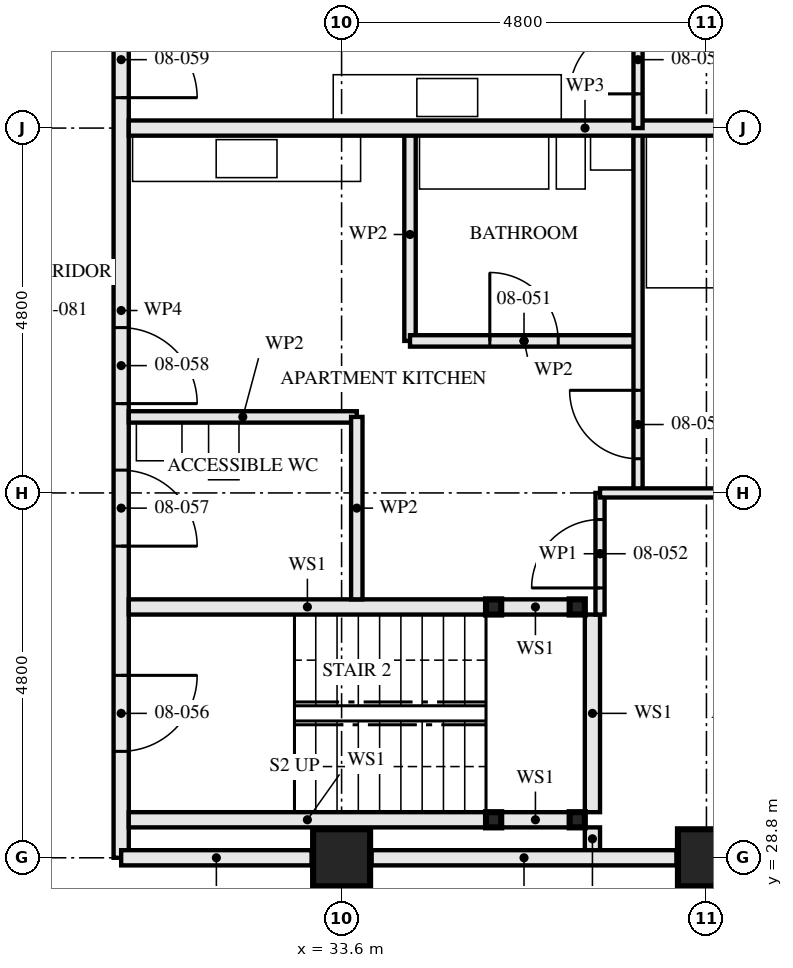
"""IFC4 building model, lengths in metres.
Left out: names, types, materials, properties, quantities, classifications, styles, units other than length and angle.
Written with IfcOpenShell. Run it as: python <this file> out.ifc"""

import sys

from ifc_helpers import new_model, si_unit, direction, frame, frame_2d, origin, origin_2d, place, context, subcontext, project, spatial, rectangle, hollow_rectangle, extrude, element, fill, save


model = new_model("IFC4")
c1 = context("Model", 3, precision=1e-05, world=origin(), true_north=direction((0.0, 1.0)))
c2 = subcontext(c1, "Body", "Model", "MODEL_VIEW")
j1 = project(units=[si_unit("LENGTHUNIT", "METRE"), si_unit("PLANEANGLEUNIT", "RADIAN")], contexts=[c1])
p1 = place(None, origin())
s1 = spatial("IfcSite", under=j1, at=p1, CompositionType="ELEMENT")
p2 = place(p1, origin())
s2 = spatial("IfcBuilding", under=s1, at=p2, CompositionType="ELEMENT")
p3 = place(p2, frame((0.0, 0.0, 34.0)))
s3 = spatial("IfcBuildingStorey", under=s2, at=p3, CompositionType="ELEMENT", Elevation=34.0)
for number, where, z_axis, x_axis in (
    (1, (33.6, 28.8, 0.0), (0.0, 0.0, 1.0), (0.0, 1.0, 0.0)),
    (2, (38.4, 28.8, 0.0), (0.0, 0.0, 1.0), (0.0, 1.0, 0.0)),
):
    element("IfcColumn", number, at=place(p3, frame(where, z_axis=z_axis, x_axis=x_axis)), inside=s3, PredefinedType="COLUMN", context=c2, shape_type="SweptSolid", body=[
        extrude(hollow_rectangle(XDim=0.75, YDim=0.75, WallThickness=0.08, at=origin_2d()), origin(), (0.0, 0.0, 1.0), 3.5),
    ])
for number, where, z_axis, x_axis in (
    (3, (36.7, 29.3, 0.0), (0.0, 0.0, 1.0), (1.0, 0.0, 0.0)),
    (4, (36.7, 32.1, 0.0), (0.0, 0.0, 1.0), (1.0, 0.0, 0.0)),
    (5, (35.6, 29.3, 0.0), (0.0, 0.0, 1.0), (1.0, 0.0, 0.0)),
    (6, (35.6, 32.1, 0.0), (0.0, 0.0, 1.0), (1.0, 0.0, 0.0)),
):
    element("IfcColumn", number, at=place(p3, frame(where, z_axis=z_axis, x_axis=x_axis)), inside=s3, PredefinedType="COLUMN", context=c2, shape_type="SweptSolid", body=[
        extrude(hollow_rectangle(XDim=0.2, YDim=0.2, WallThickness=0.008, at=origin_2d()), origin(), (0.0, 0.0, 1.0), 3.33),
    ])
p4 = place(p3, frame((38.4, 26.8, 0.0), z_axis=(0.0, 0.0, 1.0), x_axis=(0.0, 1.0, 0.0)))
e7 = element("IfcWall", 7, at=p4, inside=s3, PredefinedType="PARTITIONING", context=c2, shape_type="SweptSolid", body=[
    extrude(rectangle(XDim=1.605, YDim=0.2, at=frame_2d((0.802, 0.0))), origin(), (0.0, 0.0, 1.0), 3.33),
])
p5 = place(p4, frame((0.55, 0.0, 0.0)))
e8 = element("IfcOpeningElement", 8, at=p5, cuts=e7, PredefinedType="OPENING", context=c2, shape_type="SweptSolid", body=[
    extrude(rectangle(XDim=1.0, YDim=2.1, at=frame_2d((0.5, 1.05))), frame((0.0, 0.111, 0.0), z_axis=(0.0, -1.0, 0.0), x_axis=(1.0, 0.0, 0.0)), (0.0, 0.0, 1.0), 0.221),
])
p6 = place(p3, frame((36.6, 29.3, 0.0), z_axis=(0.0, 0.0, 1.0), x_axis=(-1.0, 0.0, 0.0)))
e9 = element("IfcWall", 9, at=p6, inside=s3, PredefinedType="SOLIDWALL", context=c2, shape_type="SweptSolid", body=[
    extrude(rectangle(XDim=0.9, YDim=0.2, at=frame_2d((0.45, 0.0))), origin(), (0.0, 0.0, 1.0), 2.99),
])
p7 = place(p3, frame((35.5, 29.3, 0.0), z_axis=(0.0, 0.0, 1.0), x_axis=(-1.0, 0.0, 0.0)))
e10 = element("IfcWall", 10, at=p7, inside=s3, PredefinedType="SOLIDWALL", context=c2, shape_type="SweptSolid", body=[
    extrude(rectangle(XDim=4.7, YDim=0.2, at=frame_2d((2.35, 0.0))), origin(), (0.0, 0.0, 1.0), 2.99),
])
p8 = place(p3, frame((36.6, 32.1, 0.0), z_axis=(0.0, 0.0, 1.0), x_axis=(-1.0, 0.0, 0.0)))
e11 = element("IfcWall", 11, at=p8, inside=s3, PredefinedType="SOLIDWALL", context=c2, shape_type="SweptSolid", body=[
    extrude(rectangle(XDim=0.9, YDim=0.2, at=frame_2d((0.45, 0.0))), origin(), (0.0, 0.0, 1.0), 2.99),
])
p9 = place(p3, frame((35.5, 32.1, 0.0), z_axis=(0.0, 0.0, 1.0), x_axis=(-1.0, 0.0, 0.0)))
e12 = element("IfcWall", 12, at=p9, inside=s3, PredefinedType="SOLIDWALL", context=c2, shape_type="SweptSolid", body=[
    extrude(rectangle(XDim=4.7, YDim=0.2, at=frame_2d((2.35, 0.0))), origin(), (0.0, 0.0, 1.0), 2.99),
])
p10 = place(p3, frame((36.9, 28.9, 0.0), z_axis=(0.0, 0.0, 1.0), x_axis=(0.0, 1.0, 0.0)))
e13 = element("IfcWall", 13, at=p10, inside=s3, PredefinedType="SOLIDWALL", context=c2, shape_type="SweptSolid", body=[
    extrude(rectangle(XDim=0.3, YDim=0.2, at=frame_2d((0.15, 0.0))), origin(), (0.0, 0.0, 1.0), 3.33),
])
p11 = place(p3, frame((36.9, 29.4, 0.0), z_axis=(0.0, 0.0, 1.0), x_axis=(0.0, 1.0, 0.0)))
e14 = element("IfcWall", 14, at=p11, inside=s3, PredefinedType="SOLIDWALL", context=c2, shape_type="SweptSolid", body=[
    extrude(rectangle(XDim=2.6, YDim=0.2, at=frame_2d((1.3, 0.0))), origin(), (0.0, 0.0, 1.0), 3.33),
])
p12 = place(p3, frame((33.8, 32.2, 0.0), z_axis=(0.0, 0.0, 1.0), x_axis=(0.0, 1.0, 0.0)))
e15 = element("IfcWall", 15, at=p12, inside=s3, PredefinedType="PARTITIONING", context=c2, shape_type="SweptSolid", body=[
    extrude(rectangle(XDim=2.4, YDim=0.15, at=frame_2d((1.2, 0.0))), origin(), (0.0, 0.0, 1.0), 2.55),
])
p13 = place(p3, frame((33.8, 34.6, 0.0), z_axis=(0.0, 0.0, 1.0), x_axis=(-1.0, 0.0, 0.0)))
e16 = element("IfcWall", 16, at=p13, inside=s3, PredefinedType="PARTITIONING", context=c2, shape_type="SweptSolid", body=[
    extrude(rectangle(XDim=3.0, YDim=0.15, at=frame_2d((1.5, 0.0))), origin(), (0.0, 0.0, 1.0), 3.33),
])
p14 = place(p3, frame((37.5, 35.6, 0.0), z_axis=(0.0, 0.0, 1.0), x_axis=(-1.0, 0.0, 0.0)))
e17 = element("IfcWall", 17, at=p14, inside=s3, PredefinedType="PARTITIONING", context=c2, shape_type="SweptSolid", body=[
    extrude(rectangle(XDim=3.0, YDim=0.15, at=frame_2d((1.5, 0.0))), origin(), (0.0, 0.0, 1.0), 3.33),
])
p15 = place(p14, frame((1.05, 0.0, 0.0)))
e18 = element("IfcOpeningElement", 18, at=p15, cuts=e17, PredefinedType="OPENING", context=c2, shape_type="SweptSolid", body=[
    extrude(rectangle(XDim=0.9, YDim=2.1, at=frame_2d((0.45, 1.05))), frame((0.0, 0.085, 0.0), z_axis=(0.0, -1.0, 0.0), x_axis=(1.0, 0.0, 0.0)), (0.0, 0.0, 1.0), 0.171),
])
p16 = place(p3, frame((34.5, 35.6, 0.0), z_axis=(0.0, 0.0, 1.0), x_axis=(0.0, 1.0, 0.0)))
e19 = element("IfcWall", 19, at=p16, inside=s3, PredefinedType="PARTITIONING", context=c2, shape_type="SweptSolid", body=[
    extrude(rectangle(XDim=2.8, YDim=0.15, at=frame_2d((1.4, 0.0))), origin(), (0.0, 0.0, 1.0), 3.33),
])
p17 = place(p3, frame((37.0, 32.0, 0.0), z_axis=(0.0, 0.0, 1.0), x_axis=(0.0, 1.0, 0.0)))
e20 = element("IfcWall", 20, at=p17, inside=s3, PredefinedType="PARTITIONING", context=c2, shape_type="SweptSolid", body=[
    extrude(rectangle(XDim=1.6, YDim=0.12, at=frame_2d((0.8, 0.0))), origin(), (0.0, 0.0, 1.0), 3.33),
])
p18 = place(p17, frame((0.35, 0.0, 0.0)))
e21 = element("IfcOpeningElement", 21, at=p18, cuts=e20, PredefinedType="OPENING", context=c2, shape_type="SweptSolid", body=[
    extrude(rectangle(XDim=0.9, YDim=2.1, at=frame_2d((0.45, 1.05))), frame((0.0, 0.071, 0.0), z_axis=(0.0, -1.0, 0.0), x_axis=(1.0, 0.0, 0.0)), (0.0, 0.0, 1.0), 0.141),
])
p19 = place(p3, frame((37.5, 33.6, 0.0), z_axis=(0.0, 0.0, 1.0), x_axis=(0.0, 1.0, 0.0)))
e22 = element("IfcWall", 22, at=p19, inside=s3, PredefinedType="PARTITIONING", context=c2, shape_type="SweptSolid", body=[
    extrude(rectangle(XDim=4.8, YDim=0.12, at=frame_2d((2.4, 0.0))), origin(), (0.0, 0.0, 1.0), 3.33),
])
p20 = place(p19, frame((0.45, 0.0, 0.0)))
e23 = element("IfcOpeningElement", 23, at=p20, cuts=e22, PredefinedType="OPENING", context=c2, shape_type="SweptSolid", body=[
    extrude(rectangle(XDim=0.9, YDim=2.1, at=frame_2d((0.45, 1.05))), frame((0.0, 0.071, 0.0), z_axis=(0.0, -1.0, 0.0), x_axis=(1.0, 0.0, 0.0)), (0.0, 0.0, 1.0), 0.141),
])
p21 = place(p3, frame((42.805, 33.6, 0.0), z_axis=(0.0, 0.0, 1.0), x_axis=(-1.0, 0.0, 0.0)))
e24 = element("IfcWall", 24, at=p21, inside=s3, PredefinedType="PARTITIONING", context=c2, shape_type="SweptSolid", body=[
    extrude(rectangle(XDim=5.805, YDim=0.12, at=frame_2d((2.902, 0.0))), origin(), (0.0, 0.0, 1.0), 2.55),
])
p22 = place(p3, frame((42.805, 38.4, 0.0), z_axis=(0.0, 0.0, 1.0), x_axis=(-1.0, 0.0, 0.0)))
e25 = element("IfcWall", 25, at=p22, inside=s3, PredefinedType="PARTITIONING", context=c2, shape_type="SweptSolid", body=[
    extrude(rectangle(XDim=12.005, YDim=0.2, at=frame_2d((6.002, 0.0))), origin(), (0.0, 0.0, 1.0), 2.55),
])
p23 = place(p3, frame((37.5, 38.4, 0.0), z_axis=(0.0, 0.0, 1.0), x_axis=(0.0, 1.0, 0.0)))
e26 = element("IfcWall", 26, at=p23, inside=s3, PredefinedType="PARTITIONING", context=c2, shape_type="SweptSolid", body=[
    extrude(rectangle(XDim=4.8, YDim=0.12, at=frame_2d((2.4, 0.0))), origin(), (0.0, 0.0, 1.0), 3.33),
])
p24 = place(p23, frame((0.45, 0.0, 0.0)))
e27 = element("IfcOpeningElement", 27, at=p24, cuts=e26, PredefinedType="OPENING", context=c2, shape_type="SweptSolid", body=[
    extrude(rectangle(XDim=0.9, YDim=2.1, at=frame_2d((0.45, 1.05))), frame((0.0, 0.071, 0.0), z_axis=(0.0, -1.0, 0.0), x_axis=(1.0, 0.0, 0.0)), (0.0, 0.0, 1.0), 0.141),
])
p25 = place(p3, frame((30.7, 28.8, 0.0), z_axis=(0.0, 0.0, 1.0), x_axis=(0.0, 1.0, 0.0)))
e28 = element("IfcWall", 28, at=p25, inside=s3, PredefinedType="PARTITIONING", context=c2, shape_type="SweptSolid", body=[
    extrude(rectangle(XDim=14.4, YDim=0.2, at=frame_2d((7.2, 0.0))), origin(), (0.0, 0.0, 1.0), 2.55),
])
p26 = place(p25, frame((1.4, 0.0, 0.0)))
e29 = element("IfcOpeningElement", 29, at=p26, cuts=e28, PredefinedType="OPENING", context=c2, shape_type="SweptSolid", body=[
    extrude(rectangle(XDim=1.0, YDim=2.1, at=frame_2d((0.5, 1.05))), frame((0.0, 0.111, 0.0), z_axis=(0.0, -1.0, 0.0), x_axis=(1.0, 0.0, 0.0)), (0.0, 0.0, 1.0), 0.221),
])
p27 = place(p25, frame((4.1, 0.0, 0.0)))
e30 = element("IfcOpeningElement", 30, at=p27, cuts=e28, PredefinedType="OPENING", context=c2, shape_type="SweptSolid", body=[
    extrude(rectangle(XDim=1.0, YDim=2.1, at=frame_2d((0.5, 1.05))), frame((0.0, 0.111, 0.0), z_axis=(0.0, -1.0, 0.0), x_axis=(1.0, 0.0, 0.0)), (0.0, 0.0, 1.0), 0.221),
])
p28 = place(p25, frame((5.975, 0.0, 0.0)))
e31 = element("IfcOpeningElement", 31, at=p28, cuts=e28, PredefinedType="OPENING", context=c2, shape_type="SweptSolid", body=[
    extrude(rectangle(XDim=1.0, YDim=2.1, at=frame_2d((0.5, 1.05))), frame((0.0, 0.111, 0.0), z_axis=(0.0, -1.0, 0.0), x_axis=(1.0, 0.0, 0.0)), (0.0, 0.0, 1.0), 0.221),
])
p29 = place(p25, frame((10.0, 0.0, 0.0)))
e32 = element("IfcOpeningElement", 32, at=p29, cuts=e28, PredefinedType="OPENING", context=c2, shape_type="SweptSolid", body=[
    extrude(rectangle(XDim=1.0, YDim=2.1, at=frame_2d((0.5, 1.05))), frame((0.0, 0.111, 0.0), z_axis=(0.0, -1.0, 0.0), x_axis=(1.0, 0.0, 0.0)), (0.0, 0.0, 1.0), 0.221),
])
p30 = place(p3, frame((38.005, 28.8, 0.0), z_axis=(0.0, 0.0, 1.0), x_axis=(-1.0, 0.0, 0.0)))
e33 = element("IfcWall", 33, at=p30, inside=s3, PredefinedType="PARTITIONING", context=c2, shape_type="SweptSolid", body=[
    extrude(rectangle(XDim=4.01, YDim=0.2, at=frame_2d((2.005, 0.0))), origin(), (0.0, 0.0, 1.0), 2.32),
])
p31 = place(p3, frame((33.205, 28.8, 0.0), z_axis=(0.0, 0.0, 1.0), x_axis=(-1.0, 0.0, 0.0)))
e34 = element("IfcWall", 34, at=p31, inside=s3, PredefinedType="PARTITIONING", context=c2, shape_type="SweptSolid", body=[
    extrude(rectangle(XDim=2.505, YDim=0.2, at=frame_2d((1.252, 0.0))), origin(), (0.0, 0.0, 1.0), 2.32),
])
p32 = place(p15, frame((0.9, 0.0, 0.0), z_axis=(0.0, 0.0, 1.0), x_axis=(-1.0, 0.0, 0.0)))
e35 = element("IfcDoor", 35, at=p32, inside=s3, OperationType="SINGLE_SWING_RIGHT", PredefinedType="DOOR", context=c2, shape_type="SweptSolid", body=[
    extrude(rectangle(XDim=0.9, YDim=2.1, at=frame_2d((0.45, 1.05))), frame((0.0, 0.022, 0.0), z_axis=(0.0, -1.0, 0.0), x_axis=(1.0, 0.0, 0.0)), (0.0, 0.0, 1.0), 0.044),
])
fill(e18, e35)
p33 = place(p18, origin())
e36 = element("IfcDoor", 36, at=p33, inside=s3, OperationType="SINGLE_SWING_RIGHT", PredefinedType="DOOR", context=c2, shape_type="SweptSolid", body=[
    extrude(rectangle(XDim=0.9, YDim=2.1, at=frame_2d((0.45, 1.05))), frame((0.0, 0.022, 0.0), z_axis=(0.0, -1.0, 0.0), x_axis=(1.0, 0.0, 0.0)), (0.0, 0.0, 1.0), 0.044),
])
fill(e21, e36)
p34 = place(p20, origin())
e37 = element("IfcDoor", 37, at=p34, inside=s3, OperationType="SINGLE_SWING_LEFT", PredefinedType="DOOR", context=c2, shape_type="SweptSolid", body=[
    extrude(rectangle(XDim=0.9, YDim=2.1, at=frame_2d((0.45, 1.05))), frame((0.0, 0.022, 0.0), z_axis=(0.0, -1.0, 0.0), x_axis=(1.0, 0.0, 0.0)), (0.0, 0.0, 1.0), 0.044),
])
fill(e23, e37)
p35 = place(p24, origin())
e38 = element("IfcDoor", 38, at=p35, inside=s3, OperationType="SINGLE_SWING_RIGHT", PredefinedType="DOOR", context=c2, shape_type="SweptSolid", body=[
    extrude(rectangle(XDim=0.9, YDim=2.1, at=frame_2d((0.45, 1.05))), frame((0.0, 0.022, 0.0), z_axis=(0.0, -1.0, 0.0), x_axis=(1.0, 0.0, 0.0)), (0.0, 0.0, 1.0), 0.044),
])
fill(e27, e38)
p36 = place(p26, frame((1.0, 0.0, 0.0), z_axis=(0.0, 0.0, 1.0), x_axis=(-1.0, 0.0, 0.0)))
e39 = element("IfcDoor", 39, at=p36, inside=s3, OperationType="SINGLE_SWING_RIGHT", PredefinedType="DOOR", context=c2, shape_type="SweptSolid", body=[
    extrude(rectangle(XDim=1.0, YDim=2.1, at=frame_2d((0.5, 1.05))), frame((0.0, 0.032, 0.0), z_axis=(0.0, -1.0, 0.0), x_axis=(1.0, 0.0, 0.0)), (0.0, 0.0, 1.0), 0.064),
])
fill(e29, e39)
p37 = place(p27, frame((1.0, 0.0, 0.0), z_axis=(0.0, 0.0, 1.0), x_axis=(-1.0, 0.0, 0.0)))
e40 = element("IfcDoor", 40, at=p37, inside=s3, OperationType="SINGLE_SWING_LEFT", PredefinedType="DOOR", context=c2, shape_type="SweptSolid", body=[
    extrude(rectangle(XDim=1.0, YDim=2.1, at=frame_2d((0.5, 1.05))), frame((0.0, 0.027, 0.0), z_axis=(0.0, -1.0, 0.0), x_axis=(1.0, 0.0, 0.0)), (0.0, 0.0, 1.0), 0.054),
])
fill(e30, e40)
p38 = place(p28, frame((1.0, 0.0, 0.0), z_axis=(0.0, 0.0, 1.0), x_axis=(-1.0, 0.0, 0.0)))
e41 = element("IfcDoor", 41, at=p38, inside=s3, OperationType="SINGLE_SWING_LEFT", PredefinedType="DOOR", context=c2, shape_type="SweptSolid", body=[
    extrude(rectangle(XDim=1.0, YDim=2.1, at=frame_2d((0.5, 1.05))), frame((0.0, 0.027, 0.0), z_axis=(0.0, -1.0, 0.0), x_axis=(1.0, 0.0, 0.0)), (0.0, 0.0, 1.0), 0.054),
])
fill(e31, e41)
p39 = place(p29, frame((1.0, 0.0, 0.0), z_axis=(0.0, 0.0, 1.0), x_axis=(-1.0, 0.0, 0.0)))
e42 = element("IfcDoor", 42, at=p39, inside=s3, OperationType="SINGLE_SWING_LEFT", PredefinedType="DOOR", context=c2, shape_type="SweptSolid", body=[
    extrude(rectangle(XDim=1.0, YDim=2.1, at=frame_2d((0.5, 1.05))), frame((0.0, 0.027, 0.0), z_axis=(0.0, -1.0, 0.0), x_axis=(1.0, 0.0, 0.0)), (0.0, 0.0, 1.0), 0.054),
])
fill(e32, e42)
save(model, sys.argv[1])
